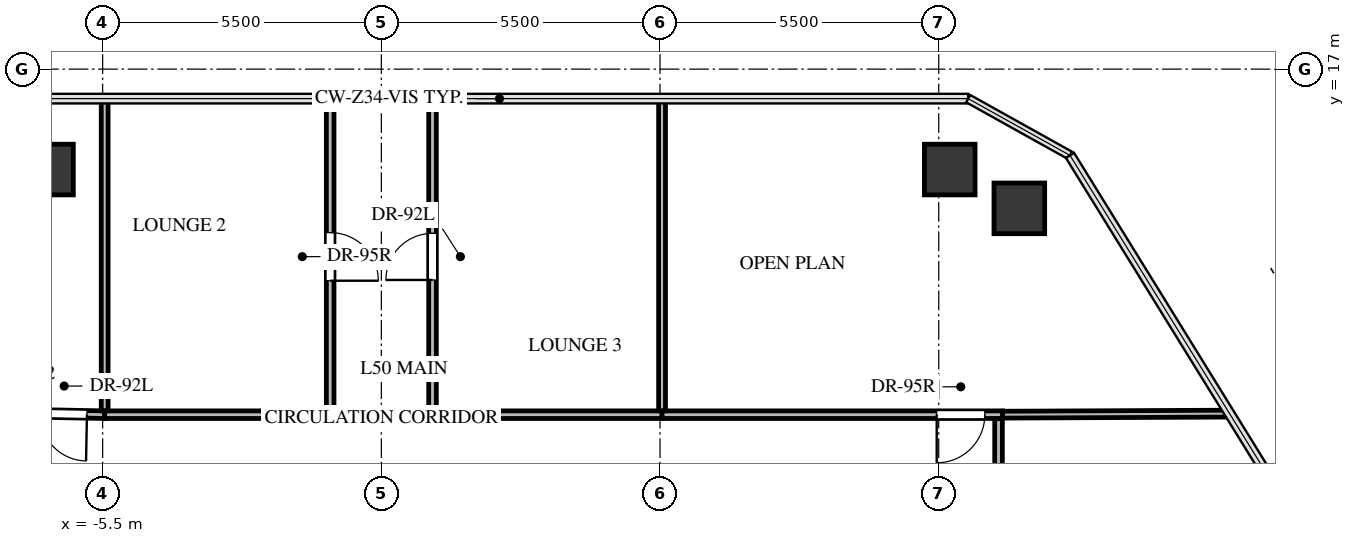
"""IFC4 building model, lengths in metres.
Left out: names, types, materials, properties, quantities, classifications, styles, units other than length and angle.
Written with IfcOpenShell. Run it as: python <this file> out.ifc"""

import sys

from ifc_helpers import new_model, si_unit, direction, frame, frame_2d, origin, origin_2d, place, context, subcontext, project, spatial, rectangle, extrude, source, transform, mapped, element, fill, save


model = new_model("IFC4")
c1 = context("Model", 3, precision=1e-05, world=origin(), true_north=direction((0.0, 1.0)))
c2 = subcontext(c1, "Body", "Model", "MODEL_VIEW")
j1 = project(units=[si_unit("LENGTHUNIT", "METRE"), si_unit("PLANEANGLEUNIT", "RADIAN")], contexts=[c1])
p1 = place(None, origin())
s1 = spatial("IfcSite", under=j1, at=p1, CompositionType="ELEMENT")
p2 = place(p1, origin())
s2 = spatial("IfcBuilding", under=s1, at=p2, CompositionType="ELEMENT")
p3 = place(p2, frame((0.0, 0.0, 183.7)))
s3 = spatial("IfcBuildingStorey", under=s2, at=p3, CompositionType="ELEMENT", Elevation=183.7)
m1 = source(origin(), c2, "Body", "SweptSolid", [
    extrude(rectangle(XDim=1.0, YDim=1.0, at=origin_2d()), origin(), (0.0, 0.0, 1.0), 3.3),
])
for number, where, z_axis, x_axis in (
    (1, (-6.579, 15.018, -0.24), (0.0, 0.0, 1.0), (1.0, 0.0, 0.0)),
    (2, (11.218, 15.018, -0.24), (0.0, 0.0, 1.0), (1.0, 0.0, 0.0)),
    (3, (12.591, 14.252, -0.24), (0.0, 0.0, 1.0), (1.0, 0.0, 0.0)),
):
    element("IfcColumn", number, at=place(p3, frame(where, z_axis=z_axis, x_axis=x_axis)), inside=s3, PredefinedType="COLUMN", context=c2, shape_type="MappedRepresentation", body=[
        mapped(m1, transform((0.0, 0.0, 0.0), x_axis=(1.0, 0.0, 0.0), y_axis=(0.0, 1.0, 0.0), z_axis=(0.0, 0.0, 1.0), scale=1.0)),
    ])
p4 = place(p3, frame((-5.46, 10.18, 0.0), z_axis=(0.0, 0.0, 1.0), x_axis=(-0.99981828266, 0.019063096779, 0.0)))
e4 = element("IfcWall", 4, at=p4, inside=s3, PredefinedType="PARTITIONING", context=c2, shape_type="SweptSolid", body=[
    extrude(rectangle(XDim=7.121, YDim=0.15, at=frame_2d((3.56, 0.0))), origin(), (0.0, 0.0, 1.0), 2.242),
])
p5 = place(p4, frame((0.35, 0.0, 0.0)))
e5 = element("IfcOpeningElement", 5, at=p5, cuts=e4, PredefinedType="OPENING", context=c2, shape_type="SweptSolid", body=[
    extrude(rectangle(XDim=0.92, YDim=2.1, at=frame_2d((0.46, 1.05))), frame((0.0, 0.085, 0.0), z_axis=(0.0, -1.0, 0.0), x_axis=(1.0, 0.0, 0.0)), (0.0, 0.0, 1.0), 0.17),
])
p6 = place(p3, frame((-1.01, 16.418, 0.0), z_axis=(0.0, 0.0, 1.0), x_axis=(0.0, -1.0, 0.0)))
e6 = element("IfcWall", 6, at=p6, inside=s3, PredefinedType="PARTITIONING", context=c2, shape_type="SweptSolid", body=[
    extrude(rectangle(XDim=6.238, YDim=0.15, at=frame_2d((3.119, 0.0))), origin(), (0.0, 0.0, 1.0), 2.399),
])
p7 = place(p6, frame((2.644, 0.0, 0.0)))
e7 = element("IfcOpeningElement", 7, at=p7, cuts=e6, PredefinedType="OPENING", context=c2, shape_type="SweptSolid", body=[
    extrude(rectangle(XDim=0.95, YDim=2.1, at=frame_2d((0.475, 1.05))), frame((0.0, 0.085, 0.0), z_axis=(0.0, -1.0, 0.0), x_axis=(1.0, 0.0, 0.0)), (0.0, 0.0, 1.0), 0.17),
])
p8 = place(p3, frame((-1.089, 10.18, 0.0), z_axis=(0.0, 0.0, 1.0), x_axis=(-1.0, 0.0, 0.0)))
e8 = element("IfcWall", 8, at=p8, inside=s3, PredefinedType="PARTITIONING", context=c2, shape_type="SweptSolid", body=[
    extrude(rectangle(XDim=4.371, YDim=0.15, at=frame_2d((2.186, 0.0))), origin(), (0.0, 0.0, 1.0), 2.608),
])
p9 = place(p3, frame((1.01, 10.18, 0.0), z_axis=(0.0, 0.0, 1.0), x_axis=(0.0, 1.0, 0.0)))
e9 = element("IfcWall", 9, at=p9, inside=s3, PredefinedType="PARTITIONING", context=c2, shape_type="SweptSolid", body=[
    extrude(rectangle(XDim=6.238, YDim=0.15, at=frame_2d((3.119, 0.0))), origin(), (0.0, 0.0, 1.0), 2.399),
])
p10 = place(p9, frame((2.659, 0.0, 0.0)))
e10 = element("IfcOpeningElement", 10, at=p10, cuts=e9, PredefinedType="OPENING", context=c2, shape_type="SweptSolid", body=[
    extrude(rectangle(XDim=0.92, YDim=2.1, at=frame_2d((0.46, 1.05))), frame((0.0, 0.085, 0.0), z_axis=(0.0, -1.0, 0.0), x_axis=(1.0, 0.0, 0.0)), (0.0, 0.0, 1.0), 0.17),
])
p11 = place(p3, frame((5.54, 10.18, 0.0), z_axis=(0.0, 0.0, 1.0), x_axis=(-1.0, 0.0, 0.0)))
e11 = element("IfcWall", 11, at=p11, inside=s3, PredefinedType="PARTITIONING", context=c2, shape_type="SweptSolid", body=[
    extrude(rectangle(XDim=4.451, YDim=0.15, at=frame_2d((2.226, 0.0))), origin(), (0.0, 0.0, 1.0), 2.608),
])
p12 = place(p3, frame((12.26, 10.18, 0.0), z_axis=(0.0, 0.0, 1.0), x_axis=(-1.0, 0.0, 0.0)))
e12 = element("IfcWall", 12, at=p12, inside=s3, PredefinedType="PARTITIONING", context=c2, shape_type="SweptSolid", body=[
    extrude(rectangle(XDim=6.72, YDim=0.15, at=frame_2d((3.36, 0.0))), origin(), (0.0, 0.0, 1.0), 2.242),
])
p13 = place(p12, frame((0.35, 0.0, 0.0)))
e13 = element("IfcOpeningElement", 13, at=p13, cuts=e12, PredefinedType="OPENING", context=c2, shape_type="SweptSolid", body=[
    extrude(rectangle(XDim=0.95, YDim=2.1, at=frame_2d((0.475, 1.05))), frame((0.0, 0.085, 0.0), z_axis=(0.0, -1.0, 0.0), x_axis=(1.0, 0.0, 0.0)), (0.0, 0.0, 1.0), 0.17),
])
p14 = place(p3, frame((12.18, 2.49, 0.0), z_axis=(0.0, 0.0, 1.0), x_axis=(0.0, 1.0, 0.0)))
e14 = element("IfcWall", 14, at=p14, inside=s3, PredefinedType="PARTITIONING", context=c2, shape_type="SweptSolid", body=[
    extrude(rectangle(XDim=7.611, YDim=0.15, at=frame_2d((3.806, 0.0))), origin(), (0.0, 0.0, 1.0), 3.045),
])
p15 = place(p14, frame((3.331, 0.0, 0.0)))
e15 = element("IfcOpeningElement", 15, at=p15, cuts=e14, PredefinedType="OPENING", context=c2, shape_type="SweptSolid", body=[
    extrude(rectangle(XDim=0.95, YDim=2.1, at=frame_2d((0.475, 1.05))), frame((0.0, 0.085, 0.0), z_axis=(0.0, -1.0, 0.0), x_axis=(1.0, 0.0, 0.0)), (0.0, 0.0, 1.0), 0.17),
])
for number, where, z_axis, x_axis in (
    (16, (-5.46, 16.418, 0.0), (0.0, 0.0, 1.0), (0.0, -1.0, 0.0)),
    (17, (5.54, 16.418, 0.0), (0.0, 0.0, 1.0), (0.0, -1.0, 0.0)),
):
    element("IfcWall", number, at=place(p3, frame(where, z_axis=z_axis, x_axis=x_axis)), inside=s3, PredefinedType="PARTITIONING", context=c2, shape_type="SweptSolid", body=[
        extrude(rectangle(XDim=6.159, YDim=0.135, at=frame_2d((3.08, 0.0))), origin(), (0.0, 0.0, 1.0), 2.399),
    ])
p16 = place(p3, frame((16.74, 10.201, 0.0), z_axis=(0.0, 0.0, 1.0), x_axis=(-0.999989522694, -0.004577608714, 0.0)))
e18 = element("IfcWall", 18, at=p16, inside=s3, PredefinedType="PARTITIONING", context=c2, shape_type="SweptSolid", body=[
    extrude(rectangle(XDim=4.48, YDim=0.135, at=frame_2d((2.24, 0.0))), origin(), (0.0, 0.0, 1.0), 2.399),
])
m2 = source(origin(), c2, "Body", "SweptSolid", [
    extrude(rectangle(XDim=0.92, YDim=2.1, at=frame_2d((0.46, 1.05))), frame((0.0, 0.025, 0.0), z_axis=(0.0, -1.0, 0.0), x_axis=(1.0, 0.0, 0.0)), (0.0, 0.0, 1.0), 0.05),
])
p17 = place(p5, origin())
e19 = element("IfcDoor", 19, at=p17, inside=s3, OperationType="SINGLE_SWING_LEFT", PredefinedType="DOOR", context=c2, shape_type="MappedRepresentation", body=[
    mapped(m2, transform((0.0, 0.0, 0.0), x_axis=(1.0, 0.0, 0.0), y_axis=(0.0, 1.0, 0.0), z_axis=(0.0, 0.0, 1.0), scale=1.0)),
])
fill(e5, e19)
m3 = source(origin(), c2, "Body", "SweptSolid", [
    extrude(rectangle(XDim=0.95, YDim=2.1, at=frame_2d((0.475, 1.05))), frame((0.0, 0.025, 0.0), z_axis=(0.0, -1.0, 0.0), x_axis=(1.0, 0.0, 0.0)), (0.0, 0.0, 1.0), 0.05),
])
p18 = place(p7, origin())
e20 = element("IfcDoor", 20, at=p18, inside=s3, OperationType="SINGLE_SWING_RIGHT", PredefinedType="DOOR", context=c2, shape_type="MappedRepresentation", body=[
    mapped(m3, transform((0.0, 0.0, 0.0), x_axis=(1.0, 0.0, 0.0), y_axis=(0.0, 1.0, 0.0), z_axis=(0.0, 0.0, 1.0), scale=1.0)),
])
fill(e7, e20)
p19 = place(p10, origin())
e21 = element("IfcDoor", 21, at=p19, inside=s3, OperationType="SINGLE_SWING_LEFT", PredefinedType="DOOR", context=c2, shape_type="MappedRepresentation", body=[
    mapped(m2, transform((0.0, 0.0, 0.0), x_axis=(1.0, 0.0, 0.0), y_axis=(0.0, 1.0, 0.0), z_axis=(0.0, 0.0, 1.0), scale=1.0)),
])
fill(e10, e21)
p20 = place(p13, origin())
e22 = element("IfcDoor", 22, at=p20, inside=s3, OperationType="SINGLE_SWING_RIGHT", PredefinedType="DOOR", context=c2, shape_type="MappedRepresentation", body=[
    mapped(m3, transform((0.0, 0.0, 0.0), x_axis=(1.0, 0.0, 0.0), y_axis=(0.0, 1.0, 0.0), z_axis=(0.0, 0.0, 1.0), scale=1.0)),
])
fill(e13, e22)
save(model, sys.argv[1])
